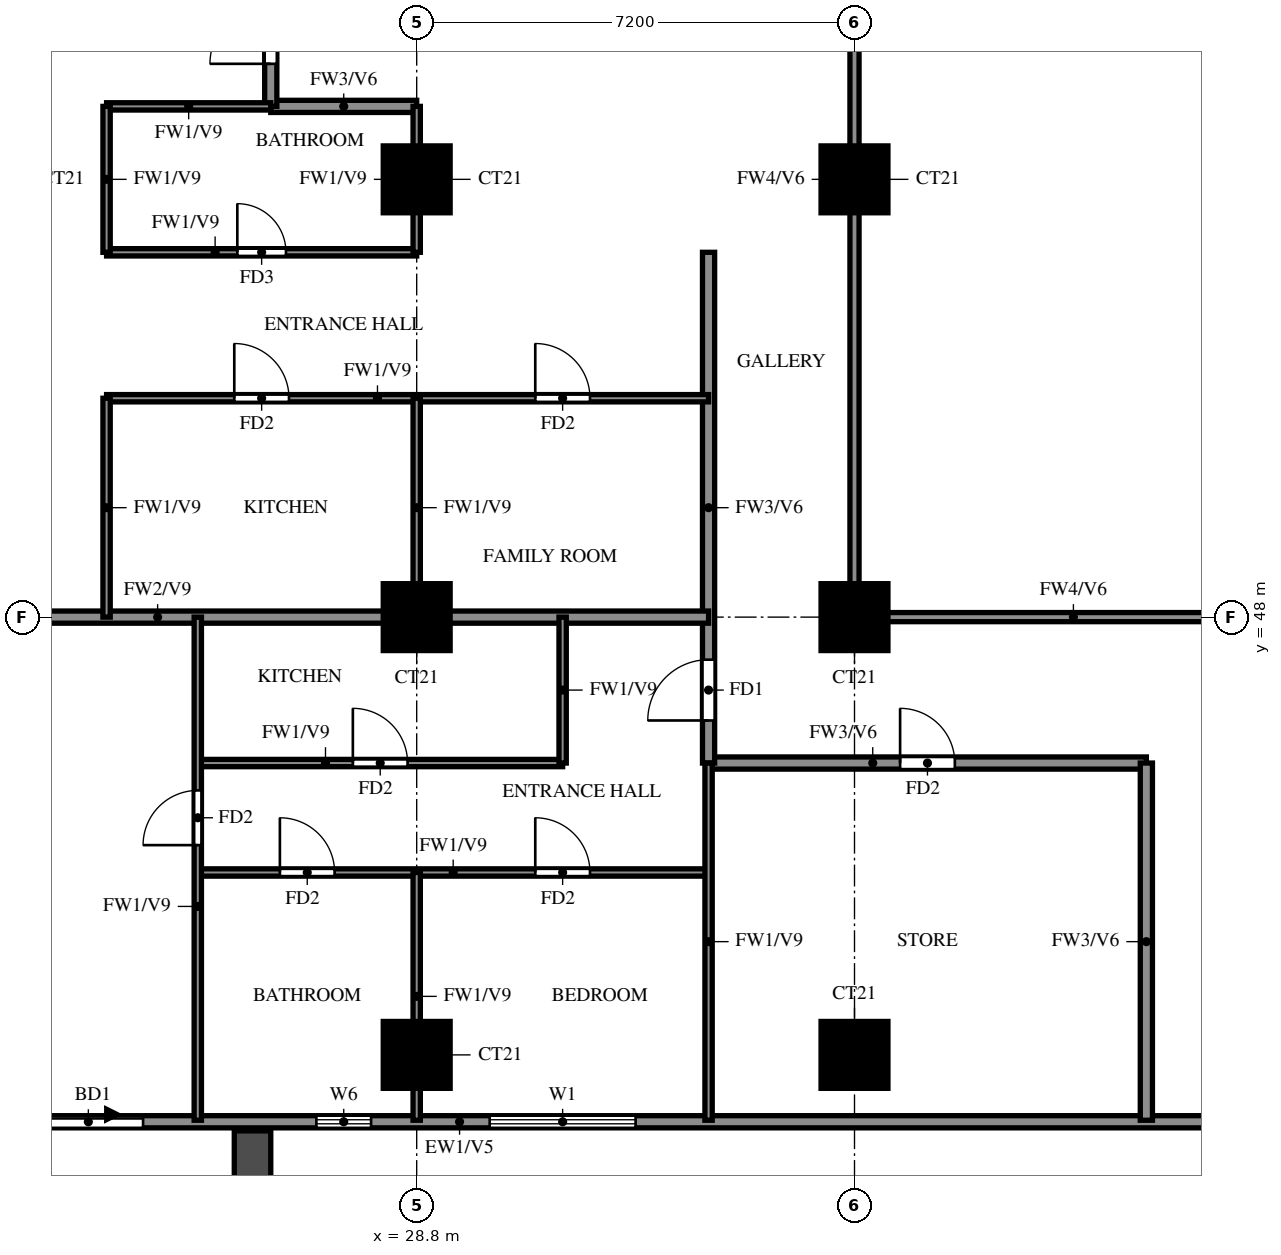
"""IFC4 building model, lengths in metres.
Left out: names, types, materials, properties, quantities, classifications, styles, units other than length and angle.
Written with IfcOpenShell. Run it as: python <this file> out.ifc"""

import sys

from ifc_helpers import new_model, si_unit, direction, frame, frame_2d, origin, origin_2d, place, context, subcontext, project, spatial, rectangle, extrude, source, transform, mapped, element, fill, save


model = new_model("IFC4")
c1 = context("Model", 3, precision=1e-05, world=origin(), true_north=direction((0.0, 1.0)))
c2 = subcontext(c1, "Body", "Model", "MODEL_VIEW")
j1 = project(units=[si_unit("LENGTHUNIT", "METRE"), si_unit("PLANEANGLEUNIT", "RADIAN")], contexts=[c1])
p1 = place(None, origin())
s1 = spatial("IfcSite", under=j1, at=p1, CompositionType="ELEMENT")
p2 = place(p1, origin())
s2 = spatial("IfcBuilding", under=s1, at=p2, CompositionType="ELEMENT")
p3 = place(p2, frame((0.0, 0.0, 134.0)))
s3 = spatial("IfcBuildingStorey", under=s2, at=p3, CompositionType="ELEMENT", Elevation=134.0)
m1 = source(origin(), c2, "Body", "SweptSolid", [
    extrude(rectangle(XDim=1.1, YDim=1.1, at=origin_2d()), origin(), (0.0, 0.0, 1.0), 3.15),
])
for number, where, z_axis, x_axis in (
    (1, (28.8, 40.8, 0.0), (0.0, 0.0, 1.0), (1.0, 0.0, 0.0)),
    (2, (36.0, 40.8, 0.0), (0.0, 0.0, 1.0), (1.0, 0.0, 0.0)),
    (3, (28.8, 48.0, 0.0), (0.0, 0.0, 1.0), (1.0, 0.0, 0.0)),
    (4, (36.0, 48.0, 0.0), (0.0, 0.0, 1.0), (1.0, 0.0, 0.0)),
    (5, (28.8, 55.2, 0.0), (0.0, 0.0, 1.0), (1.0, 0.0, 0.0)),
    (6, (36.0, 55.2, 0.0), (0.0, 0.0, 1.0), (1.0, 0.0, 0.0)),
):
    element("IfcColumn", number, at=place(p3, frame(where, z_axis=z_axis, x_axis=x_axis)), inside=s3, PredefinedType="COLUMN", context=c2, shape_type="MappedRepresentation", body=[
        mapped(m1, transform((0.0, 0.0, 0.0))),
    ])
p4 = place(p3, frame((18.2, 39.7, 0.0), z_axis=(0.0, 0.0, 1.0), x_axis=(1.0, 0.0, 0.0)))
e7 = element("IfcWall", 7, at=p4, inside=s3, PredefinedType="SOLIDWALL", context=c2, shape_type="SweptSolid", body=[
    extrude(rectangle(XDim=23.8, YDim=0.2, at=frame_2d((11.9, 0.0))), origin(), (0.0, 0.0, 1.0), 3.15),
])
p5 = place(p4, frame((4.3, 0.0, 0.0)))
e8 = element("IfcOpeningElement", 8, at=p5, cuts=e7, PredefinedType="OPENING", context=c2, shape_type="SweptSolid", body=[
    extrude(rectangle(XDim=1.8, YDim=2.4, at=frame_2d((0.9, 1.2))), frame((0.0, 0.11, 0.0), z_axis=(0.0, -1.0, 0.0), x_axis=(1.0, 0.0, 0.0)), (0.0, 0.0, 1.0), 0.22),
])
p6 = place(p4, frame((1.9, 0.0, 0.6)))
e9 = element("IfcOpeningElement", 9, at=p6, cuts=e7, PredefinedType="OPENING", context=c2, shape_type="SweptSolid", body=[
    extrude(rectangle(XDim=1.8, YDim=2.4, at=frame_2d((0.9, 1.2))), frame((0.0, 0.11, 0.0), z_axis=(0.0, -1.0, 0.0), x_axis=(1.0, 0.0, 0.0)), (0.0, 0.0, 1.0), 0.22),
])
p7 = place(p4, frame((8.95, 0.0, 1.5)))
e10 = element("IfcOpeningElement", 10, at=p7, cuts=e7, PredefinedType="OPENING", context=c2, shape_type="SweptSolid", body=[
    extrude(rectangle(XDim=0.9, YDim=0.9, at=frame_2d((0.45, 0.45))), frame((0.0, 0.11, 0.0), z_axis=(0.0, -1.0, 0.0), x_axis=(1.0, 0.0, 0.0)), (0.0, 0.0, 1.0), 0.22),
])
p8 = place(p4, frame((11.8, 0.0, 0.6)))
e11 = element("IfcOpeningElement", 11, at=p8, cuts=e7, PredefinedType="OPENING", context=c2, shape_type="SweptSolid", body=[
    extrude(rectangle(XDim=2.4, YDim=2.4, at=frame_2d((1.2, 1.2))), frame((0.0, 0.11, 0.0), z_axis=(0.0, -1.0, 0.0), x_axis=(1.0, 0.0, 0.0)), (0.0, 0.0, 1.0), 0.22),
])
p9 = place(p3, frame((26.1, 39.55, 0.0), z_axis=(0.0, 0.0, 1.0), x_axis=(0.0, -1.0, 0.0)))
e12 = element("IfcWall", 12, at=p9, inside=s3, PredefinedType="SOLIDWALL", context=c2, shape_type="SweptSolid", body=[
    extrude(rectangle(XDim=2.65, YDim=0.6, at=frame_2d((1.325, 0.0))), origin(), (0.0, 0.0, 1.0), 2.8),
])
p10 = place(p3, frame((33.6, 45.6, 0.0), z_axis=(0.0, 0.0, 1.0), x_axis=(1.0, 0.0, 0.0)))
e13 = element("IfcWall", 13, at=p10, inside=s3, PredefinedType="SOLIDWALL", context=c2, shape_type="SweptSolid", body=[
    extrude(rectangle(XDim=7.2, YDim=0.2, at=frame_2d((3.6, 0.0))), origin(), (0.0, 0.0, 1.0), 3.15),
])
p11 = place(p10, frame((3.15, 0.0, 0.0)))
e14 = element("IfcOpeningElement", 14, at=p11, cuts=e13, PredefinedType="OPENING", context=c2, shape_type="SweptSolid", body=[
    extrude(rectangle(XDim=0.9, YDim=2.1, at=frame_2d((0.45, 1.05))), frame((0.0, 0.11, 0.0), z_axis=(0.0, -1.0, 0.0), x_axis=(1.0, 0.0, 0.0)), (0.0, 0.0, 1.0), 0.22),
])
p12 = place(p3, frame((26.4, 56.4, 0.0), z_axis=(0.0, 0.0, 1.0), x_axis=(1.0, 0.0, 0.0)))
e15 = element("IfcWall", 15, at=p12, inside=s3, PredefinedType="SOLIDWALL", context=c2, shape_type="SweptSolid", body=[
    extrude(rectangle(XDim=2.4, YDim=0.2, at=frame_2d((1.2, 0.0))), origin(), (0.0, 0.0, 1.0), 3.15),
])
p13 = place(p3, frame((26.4, 56.4, 0.0), z_axis=(0.0, 0.0, 1.0), x_axis=(0.0, 1.0, 0.0)))
e16 = element("IfcWall", 16, at=p13, inside=s3, PredefinedType="SOLIDWALL", context=c2, shape_type="SweptSolid", body=[
    extrude(rectangle(XDim=9.6, YDim=0.2, at=frame_2d((4.8, 0.0))), origin(), (0.0, 0.0, 1.0), 3.15),
])
p14 = place(p13, frame((0.7, 0.0, 0.0)))
e17 = element("IfcOpeningElement", 17, at=p14, cuts=e16, PredefinedType="OPENING", context=c2, shape_type="SweptSolid", body=[
    extrude(rectangle(XDim=1.0, YDim=2.1, at=frame_2d((0.5, 1.05))), frame((0.0, 0.11, 0.0), z_axis=(0.0, -1.0, 0.0), x_axis=(1.0, 0.0, 0.0)), (0.0, 0.0, 1.0), 0.22),
])
p15 = place(p13, frame((3.1, 0.0, 0.0)))
e18 = element("IfcOpeningElement", 18, at=p15, cuts=e16, PredefinedType="OPENING", context=c2, shape_type="SweptSolid", body=[
    extrude(rectangle(XDim=1.0, YDim=2.1, at=frame_2d((0.5, 1.05))), frame((0.0, 0.11, 0.0), z_axis=(0.0, -1.0, 0.0), x_axis=(1.0, 0.0, 0.0)), (0.0, 0.0, 1.0), 0.22),
])
p16 = place(p3, frame((33.6, 45.6, 0.0), z_axis=(0.0, 0.0, 1.0), x_axis=(0.0, 1.0, 0.0)))
e19 = element("IfcWall", 19, at=p16, inside=s3, PredefinedType="SOLIDWALL", context=c2, shape_type="SweptSolid", body=[
    extrude(rectangle(XDim=8.4, YDim=0.2, at=frame_2d((4.2, 0.0))), origin(), (0.0, 0.0, 1.0), 3.15),
])
p17 = place(p16, frame((0.7, 0.0, 0.0)))
e20 = element("IfcOpeningElement", 20, at=p17, cuts=e19, PredefinedType="OPENING", context=c2, shape_type="SweptSolid", body=[
    extrude(rectangle(XDim=1.0, YDim=2.1, at=frame_2d((0.5, 1.05))), frame((0.0, 0.11, 0.0), z_axis=(0.0, -1.0, 0.0), x_axis=(1.0, 0.0, 0.0)), (0.0, 0.0, 1.0), 0.22),
])
p18 = place(p3, frame((40.8, 39.725, 0.0), z_axis=(0.0, 0.0, 1.0), x_axis=(0.0, 1.0, 0.0)))
e21 = element("IfcWall", 21, at=p18, inside=s3, PredefinedType="SOLIDWALL", context=c2, shape_type="SweptSolid", body=[
    extrude(rectangle(XDim=5.875, YDim=0.2, at=frame_2d((2.938, 0.0))), origin(), (0.0, 0.0, 1.0), 3.15),
])
p19 = place(p3, frame((14.525, 48.0, 0.0), z_axis=(0.0, 0.0, 1.0), x_axis=(1.0, 0.0, 0.0)))
e22 = element("IfcWall", 22, at=p19, inside=s3, PredefinedType="SOLIDWALL", context=c2, shape_type="SweptSolid", body=[
    extrude(rectangle(XDim=19.075, YDim=0.2, at=frame_2d((9.538, 0.0))), origin(), (0.0, 0.0, 1.0), 3.15),
])
p20 = place(p3, frame((25.2, 43.8, 0.0), z_axis=(0.0, 0.0, 1.0), x_axis=(1.0, 0.0, 0.0)))
e23 = element("IfcWall", 23, at=p20, inside=s3, PredefinedType="PARTITIONING", context=c2, shape_type="SweptSolid", body=[
    extrude(rectangle(XDim=8.4, YDim=0.12, at=frame_2d((4.2, 0.0))), origin(), (0.0, 0.0, 1.0), 3.15),
])
p21 = place(p20, frame((1.35, 0.0, 0.0)))
e24 = element("IfcOpeningElement", 24, at=p21, cuts=e23, PredefinedType="OPENING", context=c2, shape_type="SweptSolid", body=[
    extrude(rectangle(XDim=0.9, YDim=2.1, at=frame_2d((0.45, 1.05))), frame((0.0, 0.07, 0.0), z_axis=(0.0, -1.0, 0.0), x_axis=(1.0, 0.0, 0.0)), (0.0, 0.0, 1.0), 0.14),
])
p22 = place(p20, frame((5.55, 0.0, 0.0)))
e25 = element("IfcOpeningElement", 25, at=p22, cuts=e23, PredefinedType="OPENING", context=c2, shape_type="SweptSolid", body=[
    extrude(rectangle(XDim=0.9, YDim=2.1, at=frame_2d((0.45, 1.05))), frame((0.0, 0.07, 0.0), z_axis=(0.0, -1.0, 0.0), x_axis=(1.0, 0.0, 0.0)), (0.0, 0.0, 1.0), 0.14),
])
p23 = place(p3, frame((25.2, 45.6, 0.0), z_axis=(0.0, 0.0, 1.0), x_axis=(1.0, 0.0, 0.0)))
e26 = element("IfcWall", 26, at=p23, inside=s3, PredefinedType="PARTITIONING", context=c2, shape_type="SweptSolid", body=[
    extrude(rectangle(XDim=6.0, YDim=0.12, at=frame_2d((3.0, 0.0))), origin(), (0.0, 0.0, 1.0), 3.15),
])
p24 = place(p23, frame((2.55, 0.0, 0.0)))
e27 = element("IfcOpeningElement", 27, at=p24, cuts=e26, PredefinedType="OPENING", context=c2, shape_type="SweptSolid", body=[
    extrude(rectangle(XDim=0.9, YDim=2.1, at=frame_2d((0.45, 1.05))), frame((0.0, 0.07, 0.0), z_axis=(0.0, -1.0, 0.0), x_axis=(1.0, 0.0, 0.0)), (0.0, 0.0, 1.0), 0.14),
])
p25 = place(p3, frame((23.7, 51.6, 0.0), z_axis=(0.0, 0.0, 1.0), x_axis=(1.0, 0.0, 0.0)))
e28 = element("IfcWall", 28, at=p25, inside=s3, PredefinedType="PARTITIONING", context=c2, shape_type="SweptSolid", body=[
    extrude(rectangle(XDim=9.9, YDim=0.12, at=frame_2d((4.95, 0.0))), origin(), (0.0, 0.0, 1.0), 3.15),
])
p26 = place(p25, frame((2.1, 0.0, 0.0)))
e29 = element("IfcOpeningElement", 29, at=p26, cuts=e28, PredefinedType="OPENING", context=c2, shape_type="SweptSolid", body=[
    extrude(rectangle(XDim=0.9, YDim=2.1, at=frame_2d((0.45, 1.05))), frame((0.0, 0.07, 0.0), z_axis=(0.0, -1.0, 0.0), x_axis=(1.0, 0.0, 0.0)), (0.0, 0.0, 1.0), 0.14),
])
p27 = place(p25, frame((7.05, 0.0, 0.0)))
e30 = element("IfcOpeningElement", 30, at=p27, cuts=e28, PredefinedType="OPENING", context=c2, shape_type="SweptSolid", body=[
    extrude(rectangle(XDim=0.9, YDim=2.1, at=frame_2d((0.45, 1.05))), frame((0.0, 0.07, 0.0), z_axis=(0.0, -1.0, 0.0), x_axis=(1.0, 0.0, 0.0)), (0.0, 0.0, 1.0), 0.14),
])
p28 = place(p3, frame((23.7, 54.0, 0.0), z_axis=(0.0, 0.0, 1.0), x_axis=(1.0, 0.0, 0.0)))
e31 = element("IfcWall", 31, at=p28, inside=s3, PredefinedType="PARTITIONING", context=c2, shape_type="SweptSolid", body=[
    extrude(rectangle(XDim=5.1, YDim=0.12, at=frame_2d((2.55, 0.0))), origin(), (0.0, 0.0, 1.0), 3.15),
])
p29 = place(p28, frame((2.15, 0.0, 0.0)))
e32 = element("IfcOpeningElement", 32, at=p29, cuts=e31, PredefinedType="OPENING", context=c2, shape_type="SweptSolid", body=[
    extrude(rectangle(XDim=0.8, YDim=2.1, at=frame_2d((0.4, 1.05))), frame((0.0, 0.07, 0.0), z_axis=(0.0, -1.0, 0.0), x_axis=(1.0, 0.0, 0.0)), (0.0, 0.0, 1.0), 0.14),
])
p30 = place(p3, frame((23.7, 56.4, 0.0), z_axis=(0.0, 0.0, 1.0), x_axis=(1.0, 0.0, 0.0)))
e33 = element("IfcWall", 33, at=p30, inside=s3, PredefinedType="PARTITIONING", context=c2, shape_type="SweptSolid", body=[
    extrude(rectangle(XDim=2.7, YDim=0.12, at=frame_2d((1.35, 0.0))), origin(), (0.0, 0.0, 1.0), 3.15),
])
p31 = place(p3, frame((23.7, 48.0, 0.0), z_axis=(0.0, 0.0, 1.0), x_axis=(0.0, 1.0, 0.0)))
e34 = element("IfcWall", 34, at=p31, inside=s3, PredefinedType="PARTITIONING", context=c2, shape_type="SweptSolid", body=[
    extrude(rectangle(XDim=3.6, YDim=0.12, at=frame_2d((1.8, 0.0))), origin(), (0.0, 0.0, 1.0), 3.15),
])
p32 = place(p3, frame((23.7, 54.0, 0.0), z_axis=(0.0, 0.0, 1.0), x_axis=(0.0, 1.0, 0.0)))
e35 = element("IfcWall", 35, at=p32, inside=s3, PredefinedType="PARTITIONING", context=c2, shape_type="SweptSolid", body=[
    extrude(rectangle(XDim=2.4, YDim=0.12, at=frame_2d((1.2, 0.0))), origin(), (0.0, 0.0, 1.0), 3.15),
])
p33 = place(p3, frame((25.2, 39.725, 0.0), z_axis=(0.0, 0.0, 1.0), x_axis=(0.0, 1.0, 0.0)))
e36 = element("IfcWall", 36, at=p33, inside=s3, PredefinedType="PARTITIONING", context=c2, shape_type="SweptSolid", body=[
    extrude(rectangle(XDim=8.275, YDim=0.12, at=frame_2d((4.137, 0.0))), origin(), (0.0, 0.0, 1.0), 3.15),
])
p34 = place(p33, frame((4.525, 0.0, 0.0)))
e37 = element("IfcOpeningElement", 37, at=p34, cuts=e36, PredefinedType="OPENING", context=c2, shape_type="SweptSolid", body=[
    extrude(rectangle(XDim=0.9, YDim=2.1, at=frame_2d((0.45, 1.05))), frame((0.0, 0.07, 0.0), z_axis=(0.0, -1.0, 0.0), x_axis=(1.0, 0.0, 0.0)), (0.0, 0.0, 1.0), 0.14),
])
p35 = place(p3, frame((28.8, 39.725, 0.0), z_axis=(0.0, 0.0, 1.0), x_axis=(0.0, 1.0, 0.0)))
e38 = element("IfcWall", 38, at=p35, inside=s3, PredefinedType="PARTITIONING", context=c2, shape_type="SweptSolid", body=[
    extrude(rectangle(XDim=4.075, YDim=0.12, at=frame_2d((2.038, 0.0))), origin(), (0.0, 0.0, 1.0), 3.15),
])
p36 = place(p3, frame((28.8, 48.0, 0.0), z_axis=(0.0, 0.0, 1.0), x_axis=(0.0, 1.0, 0.0)))
e39 = element("IfcWall", 39, at=p36, inside=s3, PredefinedType="PARTITIONING", context=c2, shape_type="SweptSolid", body=[
    extrude(rectangle(XDim=3.6, YDim=0.12, at=frame_2d((1.8, 0.0))), origin(), (0.0, 0.0, 1.0), 3.15),
])
for number, where, z_axis, x_axis in (
    (40, (28.8, 54.0, 0.0), (0.0, 0.0, 1.0), (0.0, 1.0, 0.0)),
    (41, (31.2, 45.6, 0.0), (0.0, 0.0, 1.0), (0.0, 1.0, 0.0)),
):
    element("IfcWall", number, at=place(p3, frame(where, z_axis=z_axis, x_axis=x_axis)), inside=s3, PredefinedType="PARTITIONING", context=c2, shape_type="SweptSolid", body=[
        extrude(rectangle(XDim=2.4, YDim=0.12, at=frame_2d((1.2, 0.0))), origin(), (0.0, 0.0, 1.0), 3.15),
    ])
p37 = place(p3, frame((33.6, 39.725, 0.0), z_axis=(0.0, 0.0, 1.0), x_axis=(0.0, 1.0, 0.0)))
e42 = element("IfcWall", 42, at=p37, inside=s3, PredefinedType="PARTITIONING", context=c2, shape_type="SweptSolid", body=[
    extrude(rectangle(XDim=5.875, YDim=0.12, at=frame_2d((2.938, 0.0))), origin(), (0.0, 0.0, 1.0), 3.15),
])
p38 = place(p3, frame((36.0, 48.0, 0.0), z_axis=(0.0, 0.0, 1.0), x_axis=(1.0, 0.0, 0.0)))
e43 = element("IfcWall", 43, at=p38, inside=s3, PredefinedType="SOLIDWALL", context=c2, shape_type="SweptSolid", body=[
    extrude(rectangle(XDim=7.2, YDim=0.15, at=frame_2d((3.6, 0.0))), origin(), (0.0, 0.0, 1.0), 2.25),
])
p39 = place(p3, frame((36.0, 48.0, 0.0), z_axis=(0.0, 0.0, 1.0), x_axis=(0.0, 1.0, 0.0)))
e44 = element("IfcWall", 44, at=p39, inside=s3, PredefinedType="SOLIDWALL", context=c2, shape_type="SweptSolid", body=[
    extrude(rectangle(XDim=14.4, YDim=0.15, at=frame_2d((7.2, 0.0))), origin(), (0.0, 0.0, 1.0), 2.25),
])
p40 = place(p5, origin())
e45 = element("IfcDoor", 45, at=p40, inside=s3, OperationType="DOUBLE_DOOR_SLIDING", PredefinedType="DOOR", context=c2, shape_type="SweptSolid", body=[
    extrude(rectangle(XDim=1.8, YDim=2.4, at=frame_2d((0.9, 1.2))), frame((0.0, 0.025, 0.0), z_axis=(0.0, -1.0, 0.0), x_axis=(1.0, 0.0, 0.0)), (0.0, 0.0, 1.0), 0.05),
])
fill(e8, e45)
p41 = place(p7, origin())
e46 = element("IfcWindow", 46, at=p41, inside=s3, PartitioningType="SINGLE_PANEL", PredefinedType="WINDOW", context=c2, shape_type="SweptSolid", body=[
    extrude(rectangle(XDim=0.9, YDim=0.9, at=frame_2d((0.45, 0.45))), frame((0.0, 0.03, 0.0), z_axis=(0.0, -1.0, 0.0), x_axis=(1.0, 0.0, 0.0)), (0.0, 0.0, 1.0), 0.06),
])
fill(e10, e46)
p42 = place(p8, origin())
e47 = element("IfcWindow", 47, at=p42, inside=s3, PartitioningType="DOUBLE_PANEL_VERTICAL", PredefinedType="WINDOW", context=c2, shape_type="SweptSolid", body=[
    extrude(rectangle(XDim=2.4, YDim=2.4, at=frame_2d((1.2, 1.2))), frame((0.0, 0.03, 0.0), z_axis=(0.0, -1.0, 0.0), x_axis=(1.0, 0.0, 0.0)), (0.0, 0.0, 1.0), 0.06),
])
fill(e11, e47)
p43 = place(p17, origin())
e48 = element("IfcDoor", 48, at=p43, inside=s3, OperationType="SINGLE_SWING_LEFT", PredefinedType="DOOR", context=c2, shape_type="SweptSolid", body=[
    extrude(rectangle(XDim=1.0, YDim=2.1, at=frame_2d((0.5, 1.05))), frame((0.0, 0.025, 0.0), z_axis=(0.0, -1.0, 0.0), x_axis=(1.0, 0.0, 0.0)), (0.0, 0.0, 1.0), 0.05),
])
fill(e20, e48)
p44 = place(p34, origin())
e49 = element("IfcDoor", 49, at=p44, inside=s3, OperationType="SINGLE_SWING_RIGHT", PredefinedType="DOOR", context=c2, shape_type="SweptSolid", body=[
    extrude(rectangle(XDim=0.9, YDim=2.1, at=frame_2d((0.45, 1.05))), frame((0.0, 0.025, 0.0), z_axis=(0.0, -1.0, 0.0), x_axis=(1.0, 0.0, 0.0)), (0.0, 0.0, 1.0), 0.05),
])
fill(e37, e49)
p45 = place(p21, origin())
e50 = element("IfcDoor", 50, at=p45, inside=s3, OperationType="SINGLE_SWING_LEFT", PredefinedType="DOOR", context=c2, shape_type="SweptSolid", body=[
    extrude(rectangle(XDim=0.9, YDim=2.1, at=frame_2d((0.45, 1.05))), frame((0.0, 0.025, 0.0), z_axis=(0.0, -1.0, 0.0), x_axis=(1.0, 0.0, 0.0)), (0.0, 0.0, 1.0), 0.05),
])
fill(e24, e50)
p46 = place(p22, origin())
e51 = element("IfcDoor", 51, at=p46, inside=s3, OperationType="SINGLE_SWING_LEFT", PredefinedType="DOOR", context=c2, shape_type="SweptSolid", body=[
    extrude(rectangle(XDim=0.9, YDim=2.1, at=frame_2d((0.45, 1.05))), frame((0.0, 0.025, 0.0), z_axis=(0.0, -1.0, 0.0), x_axis=(1.0, 0.0, 0.0)), (0.0, 0.0, 1.0), 0.05),
])
fill(e25, e51)
p47 = place(p24, origin())
e52 = element("IfcDoor", 52, at=p47, inside=s3, OperationType="SINGLE_SWING_RIGHT", PredefinedType="DOOR", context=c2, shape_type="SweptSolid", body=[
    extrude(rectangle(XDim=0.9, YDim=2.1, at=frame_2d((0.45, 1.05))), frame((0.0, 0.025, 0.0), z_axis=(0.0, -1.0, 0.0), x_axis=(1.0, 0.0, 0.0)), (0.0, 0.0, 1.0), 0.05),
])
fill(e27, e52)
p48 = place(p11, origin())
e53 = element("IfcDoor", 53, at=p48, inside=s3, OperationType="SINGLE_SWING_LEFT", PredefinedType="DOOR", context=c2, shape_type="SweptSolid", body=[
    extrude(rectangle(XDim=0.9, YDim=2.1, at=frame_2d((0.45, 1.05))), frame((0.0, 0.025, 0.0), z_axis=(0.0, -1.0, 0.0), x_axis=(1.0, 0.0, 0.0)), (0.0, 0.0, 1.0), 0.05),
])
fill(e14, e53)
p49 = place(p14, origin())
e54 = element("IfcDoor", 54, at=p49, inside=s3, OperationType="SINGLE_SWING_LEFT", PredefinedType="DOOR", context=c2, shape_type="SweptSolid", body=[
    extrude(rectangle(XDim=1.0, YDim=2.1, at=frame_2d((0.5, 1.05))), frame((0.0, 0.025, 0.0), z_axis=(0.0, -1.0, 0.0), x_axis=(1.0, 0.0, 0.0)), (0.0, 0.0, 1.0), 0.05),
])
fill(e17, e54)
p50 = place(p26, origin())
e55 = element("IfcDoor", 55, at=p50, inside=s3, OperationType="SINGLE_SWING_LEFT", PredefinedType="DOOR", context=c2, shape_type="SweptSolid", body=[
    extrude(rectangle(XDim=0.9, YDim=2.1, at=frame_2d((0.45, 1.05))), frame((0.0, 0.025, 0.0), z_axis=(0.0, -1.0, 0.0), x_axis=(1.0, 0.0, 0.0)), (0.0, 0.0, 1.0), 0.05),
])
fill(e29, e55)
p51 = place(p29, origin())
e56 = element("IfcDoor", 56, at=p51, inside=s3, OperationType="SINGLE_SWING_RIGHT", PredefinedType="DOOR", context=c2, shape_type="SweptSolid", body=[
    extrude(rectangle(XDim=0.8, YDim=2.1, at=frame_2d((0.4, 1.05))), frame((0.0, 0.025, 0.0), z_axis=(0.0, -1.0, 0.0), x_axis=(1.0, 0.0, 0.0)), (0.0, 0.0, 1.0), 0.05),
])
fill(e32, e56)
p52 = place(p27, origin())
e57 = element("IfcDoor", 57, at=p52, inside=s3, OperationType="SINGLE_SWING_LEFT", PredefinedType="DOOR", context=c2, shape_type="SweptSolid", body=[
    extrude(rectangle(XDim=0.9, YDim=2.1, at=frame_2d((0.45, 1.05))), frame((0.0, 0.025, 0.0), z_axis=(0.0, -1.0, 0.0), x_axis=(1.0, 0.0, 0.0)), (0.0, 0.0, 1.0), 0.05),
])
fill(e30, e57)
save(model, sys.argv[1])
